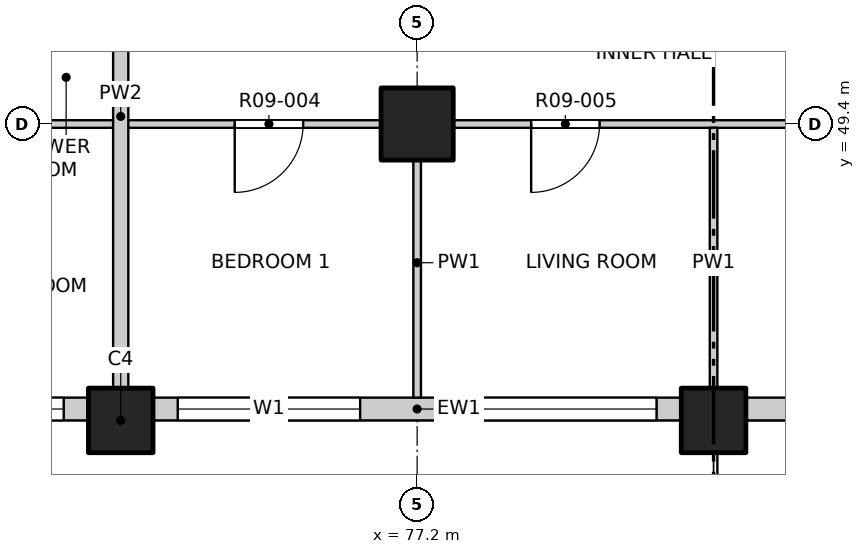
"""IFC4 building model, lengths in metres.
Left out: names, types, materials, properties, quantities, classifications, styles, units other than length and angle.
Written with IfcOpenShell. Run it as: python <this file> out.ifc"""

import sys

from ifc_helpers import new_model, si_unit, direction, frame, frame_2d, origin, origin_2d, place, context, subcontext, project, spatial, rectangle, extrude, element, fill, save


model = new_model("IFC4")
c1 = context("Model", 3, precision=1e-05, world=origin(), true_north=direction((0.0, 1.0)))
c2 = subcontext(c1, "Body", "Model", "MODEL_VIEW")
j1 = project(units=[si_unit("LENGTHUNIT", "METRE"), si_unit("PLANEANGLEUNIT", "RADIAN")], contexts=[c1])
p1 = place(None, origin())
s1 = spatial("IfcSite", under=j1, at=p1, CompositionType="ELEMENT")
p2 = place(p1, origin())
s2 = spatial("IfcBuilding", under=s1, at=p2, CompositionType="ELEMENT")
p3 = place(p2, frame((0.0, 0.0, 110.1)))
s3 = spatial("IfcBuildingStorey", under=s2, at=p3, CompositionType="ELEMENT", Elevation=110.1)
for number, where, z_axis, x_axis in (
    (1, (73.3, 45.5, -0.25), (0.0, 0.0, 1.0), (1.0, 0.0, 0.0)),
    (2, (81.1, 45.5, -0.25), (0.0, 0.0, 1.0), (1.0, 0.0, 0.0)),
):
    element("IfcColumn", number, at=place(p3, frame(where, z_axis=z_axis, x_axis=x_axis)), inside=s3, PredefinedType="COLUMN", context=c2, shape_type="SweptSolid", body=[
        extrude(rectangle(XDim=0.85, YDim=0.85, at=origin_2d()), origin(), (0.0, 0.0, 1.0), 3.4),
    ])
p4 = place(p3, frame((77.2, 49.4, -0.25), z_axis=(0.0, 0.0, 1.0), x_axis=(1.0, 0.0, 0.0)))
e3 = element("IfcColumn", 3, at=p4, inside=s3, PredefinedType="COLUMN", context=c2, shape_type="SweptSolid", body=[
    extrude(rectangle(XDim=0.95, YDim=0.95, at=origin_2d()), origin(), (0.0, 0.0, 1.0), 3.4),
])
p5 = place(p3, frame((69.4, 45.65, 0.0), z_axis=(0.0, 0.0, 1.0), x_axis=(1.0, 0.0, 0.0)))
e4 = element("IfcWall", 4, at=p5, inside=s3, PredefinedType="SOLIDWALL", context=c2, shape_type="SweptSolid", body=[
    extrude(rectangle(XDim=3.475, YDim=0.3, at=frame_2d((1.738, 0.0))), origin(), (0.0, 0.0, 1.0), 2.7),
])
p6 = place(p5, frame((0.75, 0.0, 0.9)))
e5 = element("IfcOpeningElement", 5, at=p6, cuts=e4, PredefinedType="OPENING", context=c2, shape_type="SweptSolid", body=[
    extrude(rectangle(XDim=2.4, YDim=1.8, at=frame_2d((1.2, 0.9))), frame((0.0, 0.16, 0.0), z_axis=(0.0, -1.0, 0.0), x_axis=(1.0, 0.0, 0.0)), (0.0, 0.0, 1.0), 0.32),
])
p7 = place(p3, frame((73.725, 45.65, 0.0), z_axis=(0.0, 0.0, 1.0), x_axis=(1.0, 0.0, 0.0)))
e6 = element("IfcWall", 6, at=p7, inside=s3, PredefinedType="SOLIDWALL", context=c2, shape_type="SweptSolid", body=[
    extrude(rectangle(XDim=6.95, YDim=0.3, at=frame_2d((3.475, 0.0))), origin(), (0.0, 0.0, 1.0), 2.7),
])
p8 = place(p7, frame((0.325, 0.0, 0.9)))
e7 = element("IfcOpeningElement", 7, at=p8, cuts=e6, PredefinedType="OPENING", context=c2, shape_type="SweptSolid", body=[
    extrude(rectangle(XDim=2.4, YDim=1.8, at=frame_2d((1.2, 0.9))), frame((0.0, 0.16, 0.0), z_axis=(0.0, -1.0, 0.0), x_axis=(1.0, 0.0, 0.0)), (0.0, 0.0, 1.0), 0.32),
])
p9 = place(p7, frame((4.225, 0.0, 0.9)))
e8 = element("IfcOpeningElement", 8, at=p9, cuts=e6, PredefinedType="OPENING", context=c2, shape_type="SweptSolid", body=[
    extrude(rectangle(XDim=2.4, YDim=1.8, at=frame_2d((1.2, 0.9))), frame((0.0, 0.16, 0.0), z_axis=(0.0, -1.0, 0.0), x_axis=(1.0, 0.0, 0.0)), (0.0, 0.0, 1.0), 0.32),
])
p10 = place(p3, frame((81.525, 45.65, 0.0), z_axis=(0.0, 0.0, 1.0), x_axis=(1.0, 0.0, 0.0)))
e9 = element("IfcWall", 9, at=p10, inside=s3, PredefinedType="SOLIDWALL", context=c2, shape_type="SweptSolid", body=[
    extrude(rectangle(XDim=6.95, YDim=0.3, at=frame_2d((3.475, 0.0))), origin(), (0.0, 0.0, 1.0), 2.7),
])
p11 = place(p10, frame((0.625, 0.0, 0.0)))
e10 = element("IfcOpeningElement", 10, at=p11, cuts=e9, PredefinedType="OPENING", context=c2, shape_type="SweptSolid", body=[
    extrude(rectangle(XDim=1.8, YDim=2.4, at=frame_2d((0.9, 1.2))), frame((0.0, 0.16, 0.0), z_axis=(0.0, -1.0, 0.0), x_axis=(1.0, 0.0, 0.0)), (0.0, 0.0, 1.0), 0.32),
])
p12 = place(p10, frame((4.225, 0.0, 0.9)))
e11 = element("IfcOpeningElement", 11, at=p12, cuts=e9, PredefinedType="OPENING", context=c2, shape_type="SweptSolid", body=[
    extrude(rectangle(XDim=2.4, YDim=1.8, at=frame_2d((1.2, 0.9))), frame((0.0, 0.16, 0.0), z_axis=(0.0, -1.0, 0.0), x_axis=(1.0, 0.0, 0.0)), (0.0, 0.0, 1.0), 0.32),
])
p13 = place(p3, frame((65.8, 49.4, 0.0), z_axis=(0.0, 0.0, 1.0), x_axis=(1.0, 0.0, 0.0)))
e12 = element("IfcWall", 12, at=p13, inside=s3, PredefinedType="PARTITIONING", context=c2, shape_type="SweptSolid", body=[
    extrude(rectangle(XDim=38.4, YDim=0.1, at=frame_2d((19.2, 0.0))), origin(), (0.0, 0.0, 1.0), 3.15),
])
p14 = place(p13, frame((4.19, 0.0, 0.0)))
e13 = element("IfcOpeningElement", 13, at=p14, cuts=e12, PredefinedType="OPENING", context=c2, shape_type="SweptSolid", body=[
    extrude(rectangle(XDim=0.9, YDim=2.1, at=frame_2d((0.45, 1.05))), frame((0.0, 0.06, 0.0), z_axis=(0.0, -1.0, 0.0), x_axis=(1.0, 0.0, 0.0)), (0.0, 0.0, 1.0), 0.12),
])
p15 = place(p13, frame((9.0, 0.0, 0.0)))
e14 = element("IfcOpeningElement", 14, at=p15, cuts=e12, PredefinedType="OPENING", context=c2, shape_type="SweptSolid", body=[
    extrude(rectangle(XDim=0.9, YDim=2.1, at=frame_2d((0.45, 1.05))), frame((0.0, 0.06, 0.0), z_axis=(0.0, -1.0, 0.0), x_axis=(1.0, 0.0, 0.0)), (0.0, 0.0, 1.0), 0.12),
])
p16 = place(p13, frame((12.9, 0.0, 0.0)))
e15 = element("IfcOpeningElement", 15, at=p16, cuts=e12, PredefinedType="OPENING", context=c2, shape_type="SweptSolid", body=[
    extrude(rectangle(XDim=0.9, YDim=2.1, at=frame_2d((0.45, 1.05))), frame((0.0, 0.06, 0.0), z_axis=(0.0, -1.0, 0.0), x_axis=(1.0, 0.0, 0.0)), (0.0, 0.0, 1.0), 0.12),
])
p17 = place(p13, frame((16.8, 0.0, 0.0)))
e16 = element("IfcOpeningElement", 16, at=p17, cuts=e12, PredefinedType="OPENING", context=c2, shape_type="SweptSolid", body=[
    extrude(rectangle(XDim=0.9, YDim=2.1, at=frame_2d((0.45, 1.05))), frame((0.0, 0.06, 0.0), z_axis=(0.0, -1.0, 0.0), x_axis=(1.0, 0.0, 0.0)), (0.0, 0.0, 1.0), 0.12),
])
p18 = place(p13, frame((20.7, 0.0, 0.0)))
e17 = element("IfcOpeningElement", 17, at=p18, cuts=e12, PredefinedType="OPENING", context=c2, shape_type="SweptSolid", body=[
    extrude(rectangle(XDim=0.9, YDim=2.1, at=frame_2d((0.45, 1.05))), frame((0.0, 0.06, 0.0), z_axis=(0.0, -1.0, 0.0), x_axis=(1.0, 0.0, 0.0)), (0.0, 0.0, 1.0), 0.12),
])
p19 = place(p13, frame((24.6, 0.0, 0.0)))
e18 = element("IfcOpeningElement", 18, at=p19, cuts=e12, PredefinedType="OPENING", context=c2, shape_type="SweptSolid", body=[
    extrude(rectangle(XDim=0.9, YDim=2.1, at=frame_2d((0.45, 1.05))), frame((0.0, 0.06, 0.0), z_axis=(0.0, -1.0, 0.0), x_axis=(1.0, 0.0, 0.0)), (0.0, 0.0, 1.0), 0.12),
])
p20 = place(p13, frame((28.5, 0.0, 0.0)))
e19 = element("IfcOpeningElement", 19, at=p20, cuts=e12, PredefinedType="OPENING", context=c2, shape_type="SweptSolid", body=[
    extrude(rectangle(XDim=0.9, YDim=2.1, at=frame_2d((0.45, 1.05))), frame((0.0, 0.06, 0.0), z_axis=(0.0, -1.0, 0.0), x_axis=(1.0, 0.0, 0.0)), (0.0, 0.0, 1.0), 0.12),
])
p21 = place(p13, frame((33.31, 0.0, 0.0)))
e20 = element("IfcOpeningElement", 20, at=p21, cuts=e12, PredefinedType="OPENING", context=c2, shape_type="SweptSolid", body=[
    extrude(rectangle(XDim=0.9, YDim=2.1, at=frame_2d((0.45, 1.05))), frame((0.0, 0.06, 0.0), z_axis=(0.0, -1.0, 0.0), x_axis=(1.0, 0.0, 0.0)), (0.0, 0.0, 1.0), 0.12),
])
p22 = place(p3, frame((73.3, 45.8, 0.0), z_axis=(0.0, 0.0, 1.0), x_axis=(0.0, 1.0, 0.0)))
e21 = element("IfcWall", 21, at=p22, inside=s3, PredefinedType="PARTITIONING", context=c2, shape_type="SweptSolid", body=[
    extrude(rectangle(XDim=7.4, YDim=0.2, at=frame_2d((3.7, 0.0))), origin(), (0.0, 0.0, 1.0), 3.15),
])
p23 = place(p3, frame((77.2, 45.8, 0.0), z_axis=(0.0, 0.0, 1.0), x_axis=(0.0, 1.0, 0.0)))
e22 = element("IfcWall", 22, at=p23, inside=s3, PredefinedType="PARTITIONING", context=c2, shape_type="SweptSolid", body=[
    extrude(rectangle(XDim=3.55, YDim=0.1, at=frame_2d((1.775, 0.0))), origin(), (0.0, 0.0, 1.0), 3.15),
])
p24 = place(p3, frame((81.1, 45.8, 0.0), z_axis=(0.0, 0.0, 1.0), x_axis=(0.0, 1.0, 0.0)))
e23 = element("IfcWall", 23, at=p24, inside=s3, PredefinedType="PARTITIONING", context=c2, shape_type="SweptSolid", body=[
    extrude(rectangle(XDim=3.55, YDim=0.1, at=frame_2d((1.775, 0.0))), origin(), (0.0, 0.0, 1.0), 2.55),
])
p25 = place(p6, origin())
e24 = element("IfcWindow", 24, at=p25, inside=s3, PartitioningType="DOUBLE_PANEL_VERTICAL", PredefinedType="WINDOW", context=c2, shape_type="SweptSolid", body=[
    extrude(rectangle(XDim=2.4, YDim=1.8, at=frame_2d((1.2, 0.9))), frame((0.0, 0.03, 0.0), z_axis=(0.0, -1.0, 0.0), x_axis=(1.0, 0.0, 0.0)), (0.0, 0.0, 1.0), 0.06),
])
fill(e5, e24)
p26 = place(p8, origin())
e25 = element("IfcWindow", 25, at=p26, inside=s3, PartitioningType="DOUBLE_PANEL_VERTICAL", PredefinedType="WINDOW", context=c2, shape_type="SweptSolid", body=[
    extrude(rectangle(XDim=2.4, YDim=1.8, at=frame_2d((1.2, 0.9))), frame((0.0, 0.03, 0.0), z_axis=(0.0, -1.0, 0.0), x_axis=(1.0, 0.0, 0.0)), (0.0, 0.0, 1.0), 0.06),
])
fill(e7, e25)
p27 = place(p9, origin())
e26 = element("IfcWindow", 26, at=p27, inside=s3, PartitioningType="DOUBLE_PANEL_VERTICAL", PredefinedType="WINDOW", context=c2, shape_type="SweptSolid", body=[
    extrude(rectangle(XDim=2.4, YDim=1.8, at=frame_2d((1.2, 0.9))), frame((0.0, 0.03, 0.0), z_axis=(0.0, -1.0, 0.0), x_axis=(1.0, 0.0, 0.0)), (0.0, 0.0, 1.0), 0.06),
])
fill(e8, e26)
p28 = place(p15, origin())
e27 = element("IfcDoor", 27, at=p28, inside=s3, OperationType="SINGLE_SWING_RIGHT", PredefinedType="DOOR", context=c2, shape_type="SweptSolid", body=[
    extrude(rectangle(XDim=0.9, YDim=2.1, at=frame_2d((0.45, 1.05))), frame((0.0, 0.025, 0.0), z_axis=(0.0, -1.0, 0.0), x_axis=(1.0, 0.0, 0.0)), (0.0, 0.0, 1.0), 0.05),
])
fill(e14, e27)
p29 = place(p16, origin())
e28 = element("IfcDoor", 28, at=p29, inside=s3, OperationType="SINGLE_SWING_RIGHT", PredefinedType="DOOR", context=c2, shape_type="SweptSolid", body=[
    extrude(rectangle(XDim=0.9, YDim=2.1, at=frame_2d((0.45, 1.05))), frame((0.0, 0.025, 0.0), z_axis=(0.0, -1.0, 0.0), x_axis=(1.0, 0.0, 0.0)), (0.0, 0.0, 1.0), 0.05),
])
fill(e15, e28)
save(model, sys.argv[1])
